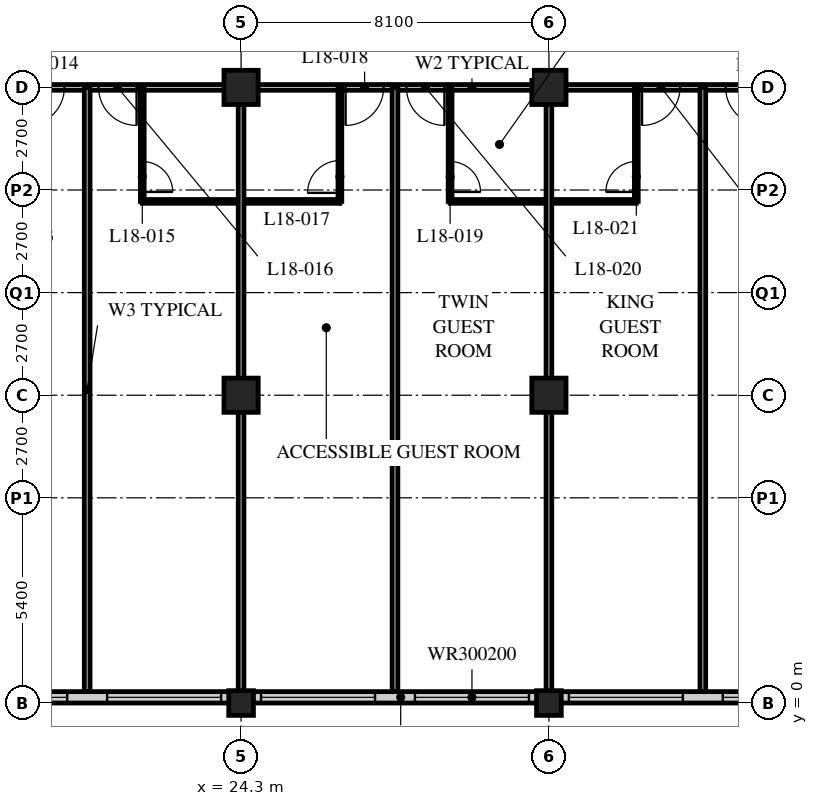
"""IFC4 building model, lengths in metres.
Left out: names, types, materials, properties, quantities, classifications, styles, units other than length and angle.
Written with IfcOpenShell. Run it as: python <this file> out.ifc"""

import sys

from ifc_helpers import new_model, si_unit, direction, frame, frame_2d, origin, origin_2d, place, context, subcontext, project, spatial, rectangle, hollow_rectangle, extrude, element, fill, save


model = new_model("IFC4")
c1 = context("Model", 3, precision=1e-05, world=origin(), true_north=direction((0.0, 1.0)))
c2 = subcontext(c1, "Body", "Model", "MODEL_VIEW")
j1 = project(units=[si_unit("LENGTHUNIT", "METRE"), si_unit("PLANEANGLEUNIT", "RADIAN")], contexts=[c1])
p1 = place(None, origin())
s1 = spatial("IfcSite", under=j1, at=p1, CompositionType="ELEMENT")
p2 = place(p1, origin())
s2 = spatial("IfcBuilding", under=s1, at=p2, CompositionType="ELEMENT")
p3 = place(p2, frame((0.0, 0.0, 73.8)))
s3 = spatial("IfcBuildingStorey", under=s2, at=p3, CompositionType="ELEMENT", Elevation=73.8)
p4 = place(p3, frame((24.3, 0.0, 0.0), z_axis=(0.0, 0.0, 1.0), x_axis=(1.0, 0.0, 0.0)))
e1 = element("IfcColumn", 1, at=p4, inside=s3, PredefinedType="COLUMN", context=c2, shape_type="SweptSolid", body=[
    extrude(hollow_rectangle(XDim=0.65, YDim=0.65, WallThickness=0.05, at=origin_2d()), origin(), (0.0, 0.0, 1.0), 3.4),
])
for number, where, z_axis, x_axis in (
    (2, (24.3, 8.1, 0.0), (0.0, 0.0, 1.0), (1.0, 0.0, 0.0)),
    (3, (24.3, 16.2, 0.0), (0.0, 0.0, 1.0), (1.0, 0.0, 0.0)),
):
    element("IfcColumn", number, at=place(p3, frame(where, z_axis=z_axis, x_axis=x_axis)), inside=s3, PredefinedType="COLUMN", context=c2, shape_type="SweptSolid", body=[
        extrude(hollow_rectangle(XDim=0.9, YDim=0.9, WallThickness=0.09, at=origin_2d()), origin(), (0.0, 0.0, 1.0), 3.4),
    ])
p5 = place(p3, frame((32.4, 0.0, 0.0), z_axis=(0.0, 0.0, 1.0), x_axis=(1.0, 0.0, 0.0)))
e4 = element("IfcColumn", 4, at=p5, inside=s3, PredefinedType="COLUMN", context=c2, shape_type="SweptSolid", body=[
    extrude(hollow_rectangle(XDim=0.65, YDim=0.65, WallThickness=0.05, at=origin_2d()), origin(), (0.0, 0.0, 1.0), 3.4),
])
for number, where, z_axis, x_axis in (
    (5, (32.4, 8.1, 0.0), (0.0, 0.0, 1.0), (1.0, 0.0, 0.0)),
    (6, (32.4, 16.2, 0.0), (0.0, 0.0, 1.0), (1.0, 0.0, 0.0)),
):
    element("IfcColumn", number, at=place(p3, frame(where, z_axis=z_axis, x_axis=x_axis)), inside=s3, PredefinedType="COLUMN", context=c2, shape_type="SweptSolid", body=[
        extrude(hollow_rectangle(XDim=0.9, YDim=0.9, WallThickness=0.09, at=origin_2d()), origin(), (0.0, 0.0, 1.0), 3.4),
    ])
p6 = place(p3, frame((8.4, 0.15, 0.0), z_axis=(0.0, 0.0, 1.0), x_axis=(1.0, 0.0, 0.0)))
e7 = element("IfcWall", 7, at=p6, inside=s3, PredefinedType="SOLIDWALL", context=c2, shape_type="SweptSolid", body=[
    extrude(rectangle(XDim=40.2, YDim=0.3, at=frame_2d((20.1, 0.0))), origin(), (0.0, 0.0, 1.0), 3.19),
])
p7 = place(p6, frame((0.225, 0.0, 0.9)))
e8 = element("IfcOpeningElement", 8, at=p7, cuts=e7, PredefinedType="OPENING", context=c2, shape_type="SweptSolid", body=[
    extrude(rectangle(XDim=3.0, YDim=2.0, at=frame_2d((1.5, 1.0))), frame((0.0, 0.16, 0.0), z_axis=(0.0, -1.0, 0.0), x_axis=(1.0, 0.0, 0.0)), (0.0, 0.0, 1.0), 0.32),
])
p8 = place(p6, frame((4.275, 0.0, 0.9)))
e9 = element("IfcOpeningElement", 9, at=p8, cuts=e7, PredefinedType="OPENING", context=c2, shape_type="SweptSolid", body=[
    extrude(rectangle(XDim=3.0, YDim=2.0, at=frame_2d((1.5, 1.0))), frame((0.0, 0.16, 0.0), z_axis=(0.0, -1.0, 0.0), x_axis=(1.0, 0.0, 0.0)), (0.0, 0.0, 1.0), 0.32),
])
p9 = place(p6, frame((8.325, 0.0, 0.9)))
e10 = element("IfcOpeningElement", 10, at=p9, cuts=e7, PredefinedType="OPENING", context=c2, shape_type="SweptSolid", body=[
    extrude(rectangle(XDim=3.0, YDim=2.0, at=frame_2d((1.5, 1.0))), frame((0.0, 0.16, 0.0), z_axis=(0.0, -1.0, 0.0), x_axis=(1.0, 0.0, 0.0)), (0.0, 0.0, 1.0), 0.32),
])
p10 = place(p6, frame((12.375, 0.0, 0.9)))
e11 = element("IfcOpeningElement", 11, at=p10, cuts=e7, PredefinedType="OPENING", context=c2, shape_type="SweptSolid", body=[
    extrude(rectangle(XDim=3.0, YDim=2.0, at=frame_2d((1.5, 1.0))), frame((0.0, 0.16, 0.0), z_axis=(0.0, -1.0, 0.0), x_axis=(1.0, 0.0, 0.0)), (0.0, 0.0, 1.0), 0.32),
])
p11 = place(p6, frame((16.425, 0.0, 0.9)))
e12 = element("IfcOpeningElement", 12, at=p11, cuts=e7, PredefinedType="OPENING", context=c2, shape_type="SweptSolid", body=[
    extrude(rectangle(XDim=3.0, YDim=2.0, at=frame_2d((1.5, 1.0))), frame((0.0, 0.16, 0.0), z_axis=(0.0, -1.0, 0.0), x_axis=(1.0, 0.0, 0.0)), (0.0, 0.0, 1.0), 0.32),
])
p12 = place(p6, frame((20.475, 0.0, 0.9)))
e13 = element("IfcOpeningElement", 13, at=p12, cuts=e7, PredefinedType="OPENING", context=c2, shape_type="SweptSolid", body=[
    extrude(rectangle(XDim=3.0, YDim=2.0, at=frame_2d((1.5, 1.0))), frame((0.0, 0.16, 0.0), z_axis=(0.0, -1.0, 0.0), x_axis=(1.0, 0.0, 0.0)), (0.0, 0.0, 1.0), 0.32),
])
p13 = place(p6, frame((24.525, 0.0, 0.9)))
e14 = element("IfcOpeningElement", 14, at=p13, cuts=e7, PredefinedType="OPENING", context=c2, shape_type="SweptSolid", body=[
    extrude(rectangle(XDim=3.0, YDim=2.0, at=frame_2d((1.5, 1.0))), frame((0.0, 0.16, 0.0), z_axis=(0.0, -1.0, 0.0), x_axis=(1.0, 0.0, 0.0)), (0.0, 0.0, 1.0), 0.32),
])
p14 = place(p6, frame((28.575, 0.0, 0.9)))
e15 = element("IfcOpeningElement", 15, at=p14, cuts=e7, PredefinedType="OPENING", context=c2, shape_type="SweptSolid", body=[
    extrude(rectangle(XDim=3.0, YDim=2.0, at=frame_2d((1.5, 1.0))), frame((0.0, 0.16, 0.0), z_axis=(0.0, -1.0, 0.0), x_axis=(1.0, 0.0, 0.0)), (0.0, 0.0, 1.0), 0.32),
])
p15 = place(p6, frame((32.625, 0.0, 0.9)))
e16 = element("IfcOpeningElement", 16, at=p15, cuts=e7, PredefinedType="OPENING", context=c2, shape_type="SweptSolid", body=[
    extrude(rectangle(XDim=3.0, YDim=2.0, at=frame_2d((1.5, 1.0))), frame((0.0, 0.16, 0.0), z_axis=(0.0, -1.0, 0.0), x_axis=(1.0, 0.0, 0.0)), (0.0, 0.0, 1.0), 0.32),
])
p16 = place(p6, frame((36.675, 0.0, 0.9)))
e17 = element("IfcOpeningElement", 17, at=p16, cuts=e7, PredefinedType="OPENING", context=c2, shape_type="SweptSolid", body=[
    extrude(rectangle(XDim=3.0, YDim=2.0, at=frame_2d((1.5, 1.0))), frame((0.0, 0.16, 0.0), z_axis=(0.0, -1.0, 0.0), x_axis=(1.0, 0.0, 0.0)), (0.0, 0.0, 1.0), 0.32),
])
p17 = place(p3, frame((12.15, 16.2, 0.0), z_axis=(0.0, 0.0, 1.0), x_axis=(1.0, 0.0, 0.0)))
e18 = element("IfcWall", 18, at=p17, inside=s3, PredefinedType="PARTITIONING", context=c2, shape_type="SweptSolid", body=[
    extrude(rectangle(XDim=36.45, YDim=0.15, at=frame_2d((18.225, 0.0))), origin(), (0.0, 0.0, 1.0), 2.578),
])
p18 = place(p17, frame((6.5, 0.0, 0.0)))
e19 = element("IfcOpeningElement", 19, at=p18, cuts=e18, PredefinedType="OPENING", context=c2, shape_type="SweptSolid", body=[
    extrude(rectangle(XDim=1.0, YDim=2.1, at=frame_2d((0.5, 1.05))), frame((0.0, 0.085, 0.0), z_axis=(0.0, -1.0, 0.0), x_axis=(1.0, 0.0, 0.0)), (0.0, 0.0, 1.0), 0.17),
])
p19 = place(p17, frame((8.4, 0.0, 0.0)))
e20 = element("IfcOpeningElement", 20, at=p19, cuts=e18, PredefinedType="OPENING", context=c2, shape_type="SweptSolid", body=[
    extrude(rectangle(XDim=1.0, YDim=2.1, at=frame_2d((0.5, 1.05))), frame((0.0, 0.085, 0.0), z_axis=(0.0, -1.0, 0.0), x_axis=(1.0, 0.0, 0.0)), (0.0, 0.0, 1.0), 0.17),
])
p20 = place(p17, frame((14.9, 0.0, 0.0)))
e21 = element("IfcOpeningElement", 21, at=p20, cuts=e18, PredefinedType="OPENING", context=c2, shape_type="SweptSolid", body=[
    extrude(rectangle(XDim=1.0, YDim=2.1, at=frame_2d((0.5, 1.05))), frame((0.0, 0.085, 0.0), z_axis=(0.0, -1.0, 0.0), x_axis=(1.0, 0.0, 0.0)), (0.0, 0.0, 1.0), 0.17),
])
p21 = place(p17, frame((16.5, 0.0, 0.0)))
e22 = element("IfcOpeningElement", 22, at=p21, cuts=e18, PredefinedType="OPENING", context=c2, shape_type="SweptSolid", body=[
    extrude(rectangle(XDim=1.0, YDim=2.1, at=frame_2d((0.5, 1.05))), frame((0.0, 0.085, 0.0), z_axis=(0.0, -1.0, 0.0), x_axis=(1.0, 0.0, 0.0)), (0.0, 0.0, 1.0), 0.17),
])
p22 = place(p17, frame((22.7, 0.0, 0.0)))
e23 = element("IfcOpeningElement", 23, at=p22, cuts=e18, PredefinedType="OPENING", context=c2, shape_type="SweptSolid", body=[
    extrude(rectangle(XDim=1.0, YDim=2.1, at=frame_2d((0.5, 1.05))), frame((0.0, 0.085, 0.0), z_axis=(0.0, -1.0, 0.0), x_axis=(1.0, 0.0, 0.0)), (0.0, 0.0, 1.0), 0.17),
])
p23 = place(p17, frame((24.9, 0.0, 0.0)))
e24 = element("IfcOpeningElement", 24, at=p23, cuts=e18, PredefinedType="OPENING", context=c2, shape_type="SweptSolid", body=[
    extrude(rectangle(XDim=1.0, YDim=2.1, at=frame_2d((0.5, 1.05))), frame((0.0, 0.085, 0.0), z_axis=(0.0, -1.0, 0.0), x_axis=(1.0, 0.0, 0.0)), (0.0, 0.0, 1.0), 0.17),
])
p24 = place(p17, frame((30.8, 0.0, 0.0)))
e25 = element("IfcOpeningElement", 25, at=p24, cuts=e18, PredefinedType="OPENING", context=c2, shape_type="SweptSolid", body=[
    extrude(rectangle(XDim=1.0, YDim=2.1, at=frame_2d((0.5, 1.05))), frame((0.0, 0.085, 0.0), z_axis=(0.0, -1.0, 0.0), x_axis=(1.0, 0.0, 0.0)), (0.0, 0.0, 1.0), 0.17),
])
p25 = place(p17, frame((1.525, 0.0, 0.0)))
e26 = element("IfcOpeningElement", 26, at=p25, cuts=e18, PredefinedType="OPENING", context=c2, shape_type="SweptSolid", body=[
    extrude(rectangle(XDim=1.0, YDim=2.1, at=frame_2d((0.5, 1.05))), frame((0.0, 0.085, 0.0), z_axis=(0.0, -1.0, 0.0), x_axis=(1.0, 0.0, 0.0)), (0.0, 0.0, 1.0), 0.17),
])
p26 = place(p17, frame((33.925, 0.0, 0.0)))
e27 = element("IfcOpeningElement", 27, at=p26, cuts=e18, PredefinedType="OPENING", context=c2, shape_type="SweptSolid", body=[
    extrude(rectangle(XDim=1.0, YDim=2.1, at=frame_2d((0.5, 1.05))), frame((0.0, 0.085, 0.0), z_axis=(0.0, -1.0, 0.0), x_axis=(1.0, 0.0, 0.0)), (0.0, 0.0, 1.0), 0.17),
])
p27 = place(p3, frame((20.25, 16.2, 0.0), z_axis=(0.0, 0.0, 1.0), x_axis=(0.0, -1.0, 0.0)))
e28 = element("IfcWall", 28, at=p27, inside=s3, PredefinedType="PARTITIONING", context=c2, shape_type="SweptSolid", body=[
    extrude(rectangle(XDim=15.9, YDim=0.15, at=frame_2d((7.95, 0.0))), origin(), (0.0, 0.0, 1.0), 3.19),
])
p28 = place(p3, frame((21.7, 13.2, 0.0), z_axis=(0.0, 0.0, 1.0), x_axis=(1.0, 0.0, 0.0)))
e29 = element("IfcWall", 29, at=p28, inside=s3, PredefinedType="PARTITIONING", context=c2, shape_type="SweptSolid", body=[
    extrude(rectangle(XDim=5.2, YDim=0.1, at=frame_2d((2.6, 0.0))), origin(), (0.0, 0.0, 1.0), 3.19),
])
p29 = place(p3, frame((21.7, 16.2, 0.0), z_axis=(0.0, 0.0, 1.0), x_axis=(0.0, -1.0, 0.0)))
e30 = element("IfcWall", 30, at=p29, inside=s3, PredefinedType="PARTITIONING", context=c2, shape_type="SweptSolid", body=[
    extrude(rectangle(XDim=3.0, YDim=0.1, at=frame_2d((1.5, 0.0))), origin(), (0.0, 0.0, 1.0), 3.19),
])
p30 = place(p29, frame((1.95, 0.0, 0.0)))
e31 = element("IfcOpeningElement", 31, at=p30, cuts=e30, PredefinedType="OPENING", context=c2, shape_type="SweptSolid", body=[
    extrude(rectangle(XDim=0.8, YDim=2.1, at=frame_2d((0.4, 1.05))), frame((0.0, 0.06, 0.0), z_axis=(0.0, -1.0, 0.0), x_axis=(1.0, 0.0, 0.0)), (0.0, 0.0, 1.0), 0.12),
])
p31 = place(p3, frame((24.3, 16.2, 0.0), z_axis=(0.0, 0.0, 1.0), x_axis=(0.0, -1.0, 0.0)))
e32 = element("IfcWall", 32, at=p31, inside=s3, PredefinedType="PARTITIONING", context=c2, shape_type="SweptSolid", body=[
    extrude(rectangle(XDim=15.9, YDim=0.15, at=frame_2d((7.95, 0.0))), origin(), (0.0, 0.0, 1.0), 2.578),
])
p32 = place(p3, frame((26.9, 16.2, 0.0), z_axis=(0.0, 0.0, 1.0), x_axis=(0.0, -1.0, 0.0)))
e33 = element("IfcWall", 33, at=p32, inside=s3, PredefinedType="PARTITIONING", context=c2, shape_type="SweptSolid", body=[
    extrude(rectangle(XDim=3.0, YDim=0.1, at=frame_2d((1.5, 0.0))), origin(), (0.0, 0.0, 1.0), 3.19),
])
p33 = place(p32, frame((1.925, 0.0, 0.0)))
e34 = element("IfcOpeningElement", 34, at=p33, cuts=e33, PredefinedType="OPENING", context=c2, shape_type="SweptSolid", body=[
    extrude(rectangle(XDim=0.85, YDim=2.1, at=frame_2d((0.425, 1.05))), frame((0.0, 0.06, 0.0), z_axis=(0.0, -1.0, 0.0), x_axis=(1.0, 0.0, 0.0)), (0.0, 0.0, 1.0), 0.12),
])
p34 = place(p3, frame((28.35, 16.2, 0.0), z_axis=(0.0, 0.0, 1.0), x_axis=(0.0, -1.0, 0.0)))
e35 = element("IfcWall", 35, at=p34, inside=s3, PredefinedType="PARTITIONING", context=c2, shape_type="SweptSolid", body=[
    extrude(rectangle(XDim=15.9, YDim=0.15, at=frame_2d((7.95, 0.0))), origin(), (0.0, 0.0, 1.0), 3.19),
])
p35 = place(p3, frame((29.8, 13.2, 0.0), z_axis=(0.0, 0.0, 1.0), x_axis=(1.0, 0.0, 0.0)))
e36 = element("IfcWall", 36, at=p35, inside=s3, PredefinedType="PARTITIONING", context=c2, shape_type="SweptSolid", body=[
    extrude(rectangle(XDim=4.9, YDim=0.1, at=frame_2d((2.45, 0.0))), origin(), (0.0, 0.0, 1.0), 3.19),
])
p36 = place(p3, frame((29.8, 16.2, 0.0), z_axis=(0.0, 0.0, 1.0), x_axis=(0.0, -1.0, 0.0)))
e37 = element("IfcWall", 37, at=p36, inside=s3, PredefinedType="PARTITIONING", context=c2, shape_type="SweptSolid", body=[
    extrude(rectangle(XDim=3.0, YDim=0.1, at=frame_2d((1.5, 0.0))), origin(), (0.0, 0.0, 1.0), 3.19),
])
p37 = place(p36, frame((1.95, 0.0, 0.0)))
e38 = element("IfcOpeningElement", 38, at=p37, cuts=e37, PredefinedType="OPENING", context=c2, shape_type="SweptSolid", body=[
    extrude(rectangle(XDim=0.8, YDim=2.1, at=frame_2d((0.4, 1.05))), frame((0.0, 0.06, 0.0), z_axis=(0.0, -1.0, 0.0), x_axis=(1.0, 0.0, 0.0)), (0.0, 0.0, 1.0), 0.12),
])
p38 = place(p3, frame((32.4, 16.2, 0.0), z_axis=(0.0, 0.0, 1.0), x_axis=(0.0, -1.0, 0.0)))
e39 = element("IfcWall", 39, at=p38, inside=s3, PredefinedType="PARTITIONING", context=c2, shape_type="SweptSolid", body=[
    extrude(rectangle(XDim=15.9, YDim=0.15, at=frame_2d((7.95, 0.0))), origin(), (0.0, 0.0, 1.0), 2.578),
])
p39 = place(p3, frame((34.7, 16.2, 0.0), z_axis=(0.0, 0.0, 1.0), x_axis=(0.0, -1.0, 0.0)))
e40 = element("IfcWall", 40, at=p39, inside=s3, PredefinedType="PARTITIONING", context=c2, shape_type="SweptSolid", body=[
    extrude(rectangle(XDim=3.0, YDim=0.1, at=frame_2d((1.5, 0.0))), origin(), (0.0, 0.0, 1.0), 3.19),
])
p40 = place(p39, frame((1.95, 0.0, 0.0)))
e41 = element("IfcOpeningElement", 41, at=p40, cuts=e40, PredefinedType="OPENING", context=c2, shape_type="SweptSolid", body=[
    extrude(rectangle(XDim=0.8, YDim=2.1, at=frame_2d((0.4, 1.05))), frame((0.0, 0.06, 0.0), z_axis=(0.0, -1.0, 0.0), x_axis=(1.0, 0.0, 0.0)), (0.0, 0.0, 1.0), 0.12),
])
p41 = place(p3, frame((36.45, 16.2, 0.0), z_axis=(0.0, 0.0, 1.0), x_axis=(0.0, -1.0, 0.0)))
e42 = element("IfcWall", 42, at=p41, inside=s3, PredefinedType="PARTITIONING", context=c2, shape_type="SweptSolid", body=[
    extrude(rectangle(XDim=15.9, YDim=0.15, at=frame_2d((7.95, 0.0))), origin(), (0.0, 0.0, 1.0), 3.19),
])
p42 = place(p9, origin())
e43 = element("IfcWindow", 43, at=p42, inside=s3, PartitioningType="SINGLE_PANEL", PredefinedType="WINDOW", context=c2, shape_type="SweptSolid", body=[
    extrude(rectangle(XDim=3.0, YDim=2.0, at=frame_2d((1.5, 1.0))), frame((0.0, 0.03, 0.0), z_axis=(0.0, -1.0, 0.0), x_axis=(1.0, 0.0, 0.0)), (0.0, 0.0, 1.0), 0.06),
])
fill(e10, e43)
p43 = place(p10, origin())
e44 = element("IfcWindow", 44, at=p43, inside=s3, PartitioningType="SINGLE_PANEL", PredefinedType="WINDOW", context=c2, shape_type="SweptSolid", body=[
    extrude(rectangle(XDim=3.0, YDim=2.0, at=frame_2d((1.5, 1.0))), frame((0.0, 0.03, 0.0), z_axis=(0.0, -1.0, 0.0), x_axis=(1.0, 0.0, 0.0)), (0.0, 0.0, 1.0), 0.06),
])
fill(e11, e44)
p44 = place(p11, origin())
e45 = element("IfcWindow", 45, at=p44, inside=s3, PartitioningType="SINGLE_PANEL", PredefinedType="WINDOW", context=c2, shape_type="SweptSolid", body=[
    extrude(rectangle(XDim=3.0, YDim=2.0, at=frame_2d((1.5, 1.0))), frame((0.0, 0.03, 0.0), z_axis=(0.0, -1.0, 0.0), x_axis=(1.0, 0.0, 0.0)), (0.0, 0.0, 1.0), 0.06),
])
fill(e12, e45)
p45 = place(p12, origin())
e46 = element("IfcWindow", 46, at=p45, inside=s3, PartitioningType="SINGLE_PANEL", PredefinedType="WINDOW", context=c2, shape_type="SweptSolid", body=[
    extrude(rectangle(XDim=3.0, YDim=2.0, at=frame_2d((1.5, 1.0))), frame((0.0, 0.03, 0.0), z_axis=(0.0, -1.0, 0.0), x_axis=(1.0, 0.0, 0.0)), (0.0, 0.0, 1.0), 0.06),
])
fill(e13, e46)
p46 = place(p13, origin())
e47 = element("IfcWindow", 47, at=p46, inside=s3, PartitioningType="SINGLE_PANEL", PredefinedType="WINDOW", context=c2, shape_type="SweptSolid", body=[
    extrude(rectangle(XDim=3.0, YDim=2.0, at=frame_2d((1.5, 1.0))), frame((0.0, 0.03, 0.0), z_axis=(0.0, -1.0, 0.0), x_axis=(1.0, 0.0, 0.0)), (0.0, 0.0, 1.0), 0.06),
])
fill(e14, e47)
p47 = place(p14, origin())
e48 = element("IfcWindow", 48, at=p47, inside=s3, PartitioningType="SINGLE_PANEL", PredefinedType="WINDOW", context=c2, shape_type="SweptSolid", body=[
    extrude(rectangle(XDim=3.0, YDim=2.0, at=frame_2d((1.5, 1.0))), frame((0.0, 0.03, 0.0), z_axis=(0.0, -1.0, 0.0), x_axis=(1.0, 0.0, 0.0)), (0.0, 0.0, 1.0), 0.06),
])
fill(e15, e48)
p48 = place(p18, origin())
e49 = element("IfcDoor", 49, at=p48, inside=s3, OperationType="SINGLE_SWING_RIGHT", PredefinedType="DOOR", context=c2, shape_type="SweptSolid", body=[
    extrude(rectangle(XDim=1.0, YDim=2.1, at=frame_2d((0.5, 1.05))), frame((0.0, 0.025, 0.0), z_axis=(0.0, -1.0, 0.0), x_axis=(1.0, 0.0, 0.0)), (0.0, 0.0, 1.0), 0.05),
])
fill(e19, e49)
p49 = place(p30, origin())
e50 = element("IfcDoor", 50, at=p49, inside=s3, OperationType="SINGLE_SWING_RIGHT", PredefinedType="DOOR", context=c2, shape_type="SweptSolid", body=[
    extrude(rectangle(XDim=0.8, YDim=2.1, at=frame_2d((0.4, 1.05))), frame((0.0, 0.025, 0.0), z_axis=(0.0, -1.0, 0.0), x_axis=(1.0, 0.0, 0.0)), (0.0, 0.0, 1.0), 0.05),
])
fill(e31, e50)
p50 = place(p19, origin())
e51 = element("IfcDoor", 51, at=p50, inside=s3, OperationType="SINGLE_SWING_LEFT", PredefinedType="DOOR", context=c2, shape_type="SweptSolid", body=[
    extrude(rectangle(XDim=1.0, YDim=2.1, at=frame_2d((0.5, 1.05))), frame((0.0, 0.025, 0.0), z_axis=(0.0, -1.0, 0.0), x_axis=(1.0, 0.0, 0.0)), (0.0, 0.0, 1.0), 0.05),
])
fill(e20, e51)
p51 = place(p33, origin())
e52 = element("IfcDoor", 52, at=p51, inside=s3, OperationType="SINGLE_SWING_LEFT", PredefinedType="DOOR", context=c2, shape_type="SweptSolid", body=[
    extrude(rectangle(XDim=0.85, YDim=2.1, at=frame_2d((0.425, 1.05))), frame((0.0, 0.025, 0.0), z_axis=(0.0, -1.0, 0.0), x_axis=(1.0, 0.0, 0.0)), (0.0, 0.0, 1.0), 0.05),
])
fill(e34, e52)
p52 = place(p20, origin())
e53 = element("IfcDoor", 53, at=p52, inside=s3, OperationType="SINGLE_SWING_RIGHT", PredefinedType="DOOR", context=c2, shape_type="SweptSolid", body=[
    extrude(rectangle(XDim=1.0, YDim=2.1, at=frame_2d((0.5, 1.05))), frame((0.0, 0.025, 0.0), z_axis=(0.0, -1.0, 0.0), x_axis=(1.0, 0.0, 0.0)), (0.0, 0.0, 1.0), 0.05),
])
fill(e21, e53)
p53 = place(p37, origin())
e54 = element("IfcDoor", 54, at=p53, inside=s3, OperationType="SINGLE_SWING_RIGHT", PredefinedType="DOOR", context=c2, shape_type="SweptSolid", body=[
    extrude(rectangle(XDim=0.8, YDim=2.1, at=frame_2d((0.4, 1.05))), frame((0.0, 0.025, 0.0), z_axis=(0.0, -1.0, 0.0), x_axis=(1.0, 0.0, 0.0)), (0.0, 0.0, 1.0), 0.05),
])
fill(e38, e54)
p54 = place(p21, origin())
e55 = element("IfcDoor", 55, at=p54, inside=s3, OperationType="SINGLE_SWING_LEFT", PredefinedType="DOOR", context=c2, shape_type="SweptSolid", body=[
    extrude(rectangle(XDim=1.0, YDim=2.1, at=frame_2d((0.5, 1.05))), frame((0.0, 0.025, 0.0), z_axis=(0.0, -1.0, 0.0), x_axis=(1.0, 0.0, 0.0)), (0.0, 0.0, 1.0), 0.05),
])
fill(e22, e55)
p55 = place(p40, origin())
e56 = element("IfcDoor", 56, at=p55, inside=s3, OperationType="SINGLE_SWING_LEFT", PredefinedType="DOOR", context=c2, shape_type="SweptSolid", body=[
    extrude(rectangle(XDim=0.8, YDim=2.1, at=frame_2d((0.4, 1.05))), frame((0.0, 0.025, 0.0), z_axis=(0.0, -1.0, 0.0), x_axis=(1.0, 0.0, 0.0)), (0.0, 0.0, 1.0), 0.05),
])
fill(e41, e56)
p56 = place(p22, origin())
e57 = element("IfcDoor", 57, at=p56, inside=s3, OperationType="SINGLE_SWING_RIGHT", PredefinedType="DOOR", context=c2, shape_type="SweptSolid", body=[
    extrude(rectangle(XDim=1.0, YDim=2.1, at=frame_2d((0.5, 1.05))), frame((0.0, 0.025, 0.0), z_axis=(0.0, -1.0, 0.0), x_axis=(1.0, 0.0, 0.0)), (0.0, 0.0, 1.0), 0.05),
])
fill(e23, e57)
p57 = place(p23, origin())
e58 = element("IfcDoor", 58, at=p57, inside=s3, OperationType="SINGLE_SWING_LEFT", PredefinedType="DOOR", context=c2, shape_type="SweptSolid", body=[
    extrude(rectangle(XDim=1.0, YDim=2.1, at=frame_2d((0.5, 1.05))), frame((0.0, 0.025, 0.0), z_axis=(0.0, -1.0, 0.0), x_axis=(1.0, 0.0, 0.0)), (0.0, 0.0, 1.0), 0.05),
])
fill(e24, e58)
save(model, sys.argv[1])
